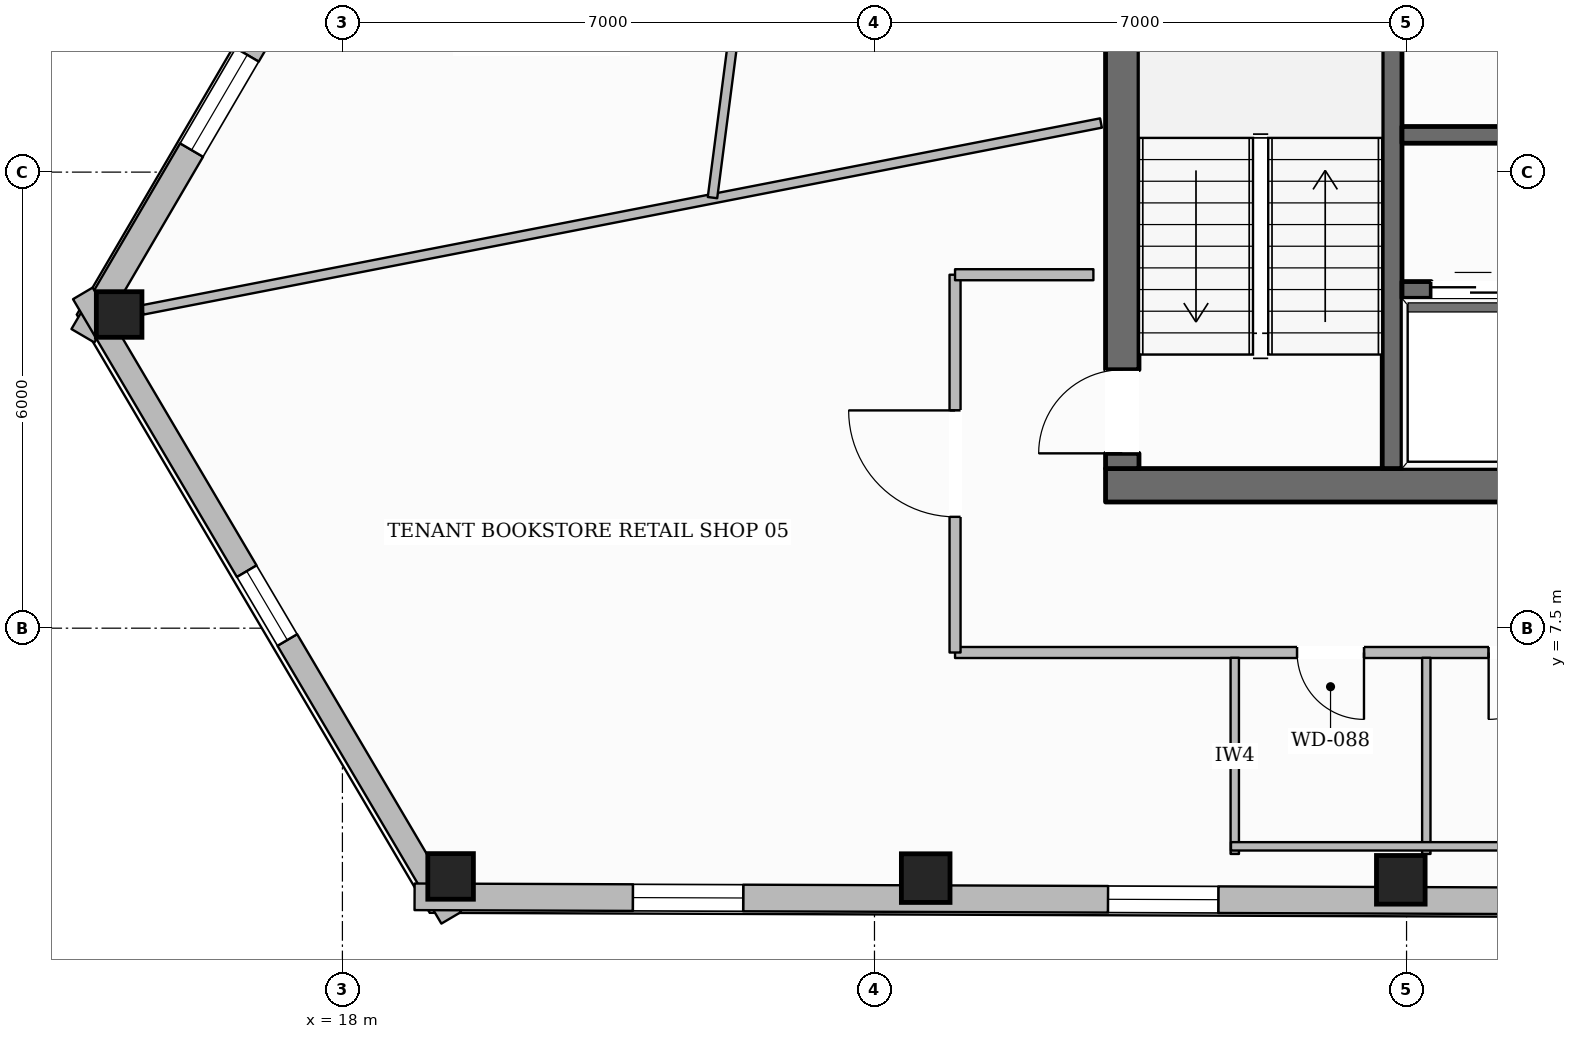
"""IFC4 building model, lengths in metres.
Left out: names, types, materials, properties, quantities, classifications, styles, units other than length and angle.
Written with IfcOpenShell. Run it as: python <this file> out.ifc"""

import sys

from ifc_helpers import new_model, si_unit, direction, frame, frame_2d, origin, origin_2d, place, context, subcontext, project, spatial, rectangle, hollow_rectangle, extrude, element, fill, save


model = new_model("IFC4")
c1 = context("Model", 3, precision=1e-05, world=origin(), true_north=direction((0.0, 1.0)))
c2 = subcontext(c1, "Body", "Model", "MODEL_VIEW")
j1 = project(units=[si_unit("LENGTHUNIT", "METRE"), si_unit("PLANEANGLEUNIT", "RADIAN")], contexts=[c1])
p1 = place(None, origin())
s1 = spatial("IfcSite", under=j1, at=p1, CompositionType="ELEMENT")
p2 = place(p1, origin())
s2 = spatial("IfcBuilding", under=s1, at=p2, CompositionType="ELEMENT")
p3 = place(p2, frame((0.0, 0.0, 199.65)))
s3 = spatial("IfcBuildingStorey", under=s2, at=p3, CompositionType="ELEMENT", Elevation=199.65)
p4 = place(p3, frame((28.04, 9.38, 0.0), z_axis=(0.0, 0.0, 1.0), x_axis=(1.0, 0.0, 0.0)))
e1 = element("IfcWall", 1, at=p4, inside=s3, PredefinedType="SOLIDWALL", context=c2, shape_type="SweptSolid", body=[
    extrude(rectangle(XDim=19.92, YDim=0.44, at=frame_2d((9.96, 0.0))), origin(), (0.0, 0.0, 1.0), 3.6),
])
p5 = place(p4, frame((10.46, 0.0, 0.0)))
e2 = element("IfcOpeningElement", 2, at=p5, cuts=e1, PredefinedType="OPENING", context=c2, shape_type="SweptSolid", body=[
    extrude(rectangle(XDim=1.4, YDim=2.2, at=frame_2d((0.7, 1.1))), frame((0.0, 0.23, 0.0), z_axis=(0.0, -1.0, 0.0), x_axis=(1.0, 0.0, 0.0)), (0.0, 0.0, 1.0), 0.46),
])
p6 = place(p3, frame((28.26, 9.6, 0.0), z_axis=(0.0, 0.0, 1.0), x_axis=(0.0, 1.0, 0.0)))
e3 = element("IfcWall", 3, at=p6, inside=s3, PredefinedType="SOLIDWALL", context=c2, shape_type="SweptSolid", body=[
    extrude(rectangle(XDim=13.0, YDim=0.44, at=frame_2d((6.5, 0.0))), origin(), (0.0, 0.0, 1.0), 3.6),
])
p7 = place(p6, frame((0.2, 0.0, 0.0)))
e4 = element("IfcOpeningElement", 4, at=p7, cuts=e3, PredefinedType="OPENING", context=c2, shape_type="SweptSolid", body=[
    extrude(rectangle(XDim=1.1, YDim=2.15, at=frame_2d((0.55, 1.075))), frame((0.0, 0.23, 0.0), z_axis=(0.0, -1.0, 0.0), x_axis=(1.0, 0.0, 0.0)), (0.0, 0.0, 1.0), 0.46),
])
p8 = place(p6, frame((8.4, 0.0, 0.0)))
e5 = element("IfcOpeningElement", 5, at=p8, cuts=e3, PredefinedType="OPENING", context=c2, shape_type="SweptSolid", body=[
    extrude(rectangle(XDim=0.9, YDim=2.1, at=frame_2d((0.45, 1.05))), frame((0.0, 0.23, 0.0), z_axis=(0.0, -1.0, 0.0), x_axis=(1.0, 0.0, 0.0)), (0.0, 0.0, 1.0), 0.46),
])
p9 = place(p3, frame((31.81, 9.6, 0.0), z_axis=(0.0, 0.0, 1.0), x_axis=(0.0, 1.0, 0.0)))
e6 = element("IfcWall", 6, at=p9, inside=s3, PredefinedType="SHEAR", context=c2, shape_type="SweptSolid", body=[
    extrude(rectangle(XDim=13.0, YDim=0.26, at=frame_2d((6.5, 0.0))), origin(), (0.0, 0.0, 1.0), 3.6),
])
p10 = place(p9, frame((10.925, 0.0, 0.0)))
e7 = element("IfcOpeningElement", 7, at=p10, cuts=e6, PredefinedType="OPENING", context=c2, shape_type="SweptSolid", body=[
    extrude(rectangle(XDim=1.25, YDim=2.25, at=frame_2d((0.625, 1.125))), frame((0.0, 0.14, 0.0), z_axis=(0.0, -1.0, 0.0), x_axis=(1.0, 0.0, 0.0)), (0.0, 0.0, 1.0), 0.28),
])
p11 = place(p3, frame((31.94, 13.99, 0.0), z_axis=(0.0, 0.0, 1.0), x_axis=(1.0, 0.0, 0.0)))
e8 = element("IfcWall", 8, at=p11, inside=s3, PredefinedType="SOLIDWALL", context=c2, shape_type="SweptSolid", body=[
    extrude(rectangle(XDim=12.12, YDim=0.22, at=frame_2d((6.06, 0.0))), origin(), (0.0, 0.0, 1.0), 3.6),
])
p12 = place(p11, frame((3.11, 0.0, 0.0)))
e9 = element("IfcOpeningElement", 9, at=p12, cuts=e8, PredefinedType="OPENING", context=c2, shape_type="SweptSolid", body=[
    extrude(rectangle(XDim=0.9, YDim=2.1, at=frame_2d((0.45, 1.05))), frame((0.0, 0.12, 0.0), z_axis=(0.0, -1.0, 0.0), x_axis=(1.0, 0.0, 0.0)), (0.0, 0.0, 1.0), 0.24),
])
p13 = place(p11, frame((9.21, 0.0, 0.0)))
e10 = element("IfcOpeningElement", 10, at=p13, cuts=e8, PredefinedType="OPENING", context=c2, shape_type="SweptSolid", body=[
    extrude(rectangle(XDim=0.9, YDim=2.1, at=frame_2d((0.45, 1.05))), frame((0.0, 0.12, 0.0), z_axis=(0.0, -1.0, 0.0), x_axis=(1.0, 0.0, 0.0)), (0.0, 0.0, 1.0), 0.24),
])
p14 = place(p3, frame((31.94, 11.95, 0.0), z_axis=(0.0, 0.0, 1.0), x_axis=(1.0, 0.0, 0.0)))
e11 = element("IfcWall", 11, at=p14, inside=s3, PredefinedType="SOLIDWALL", context=c2, shape_type="SweptSolid", body=[
    extrude(rectangle(XDim=6.19, YDim=0.22, at=frame_2d((3.095, 0.0))), origin(), (0.0, 0.0, 1.0), 3.6),
])
p15 = place(p14, frame((0.385, 0.0, 0.0)))
e12 = element("IfcOpeningElement", 12, at=p15, cuts=e11, PredefinedType="OPENING", context=c2, shape_type="SweptSolid", body=[
    extrude(rectangle(XDim=1.1, YDim=2.2, at=frame_2d((0.55, 1.1))), frame((0.0, 0.12, 0.0), z_axis=(0.0, -1.0, 0.0), x_axis=(1.0, 0.0, 0.0)), (0.0, 0.0, 1.0), 0.24),
])
p16 = place(p14, frame((2.435, 0.0, 0.0)))
e13 = element("IfcOpeningElement", 13, at=p16, cuts=e11, PredefinedType="OPENING", context=c2, shape_type="SweptSolid", body=[
    extrude(rectangle(XDim=1.1, YDim=2.2, at=frame_2d((0.55, 1.1))), frame((0.0, 0.12, 0.0), z_axis=(0.0, -1.0, 0.0), x_axis=(1.0, 0.0, 0.0)), (0.0, 0.0, 1.0), 0.24),
])
p17 = place(p14, frame((4.485, 0.0, 0.0)))
e14 = element("IfcOpeningElement", 14, at=p17, cuts=e11, PredefinedType="OPENING", context=c2, shape_type="SweptSolid", body=[
    extrude(rectangle(XDim=1.1, YDim=2.2, at=frame_2d((0.55, 1.1))), frame((0.0, 0.12, 0.0), z_axis=(0.0, -1.0, 0.0), x_axis=(1.0, 0.0, 0.0)), (0.0, 0.0, 1.0), 0.24),
])
for number, where, z_axis, x_axis in (
    (15, (15.062, 11.627, 0.0), (0.0, 0.0, 1.0), (1.0, 0.0, 0.0)),
    (16, (19.423, 4.234, 0.0), (0.0, 0.0, 1.0), (1.0, 0.0, 0.0)),
):
    element("IfcColumn", number, at=place(p3, frame(where, z_axis=z_axis, x_axis=x_axis)), inside=s3, PredefinedType="COLUMN", context=c2, shape_type="SweptSolid", body=[
        extrude(hollow_rectangle(XDim=0.6, YDim=0.6, WallThickness=0.028, at=origin_2d()), origin(), (0.0, 0.0, 1.0), 3.6),
    ])
for number, where, z_axis, x_axis in (
    (17, (25.674, 4.212, 0.0), (0.0, 0.0, 1.0), (1.0, 0.0, 0.0)),
    (18, (31.924, 4.189, 0.0), (0.0, 0.0, 1.0), (1.0, 0.0, 0.0)),
):
    element("IfcColumn", number, at=place(p3, frame(where, z_axis=z_axis, x_axis=x_axis)), inside=s3, PredefinedType="COLUMN", context=c2, shape_type="SweptSolid", body=[
        extrude(hollow_rectangle(XDim=0.64, YDim=0.64, WallThickness=0.028, at=origin_2d()), origin(), (0.0, 0.0, 1.0), 3.6),
    ])
p18 = place(p3, frame((14.586, 11.347, 0.0), z_axis=(0.0, 0.0, 1.0), x_axis=(0.504997770855, 0.863120647089, 0.0)))
e19 = element("IfcWall", 19, at=p18, inside=s3, PredefinedType="STANDARD", context=c2, shape_type="SweptSolid", body=[
    extrude(rectangle(XDim=37.843, YDim=0.35, at=frame_2d((18.921, 0.0))), origin(), (0.0, 0.0, 1.0), 3.132),
])
p19 = place(p18, frame((9.061, 0.0, 0.0)))
e20 = element("IfcOpeningElement", 20, at=p19, cuts=e19, PredefinedType="OPENING", context=c2, shape_type="SweptSolid", body=[
    extrude(rectangle(XDim=1.0, YDim=2.2, at=frame_2d((0.5, 1.1))), frame((0.0, 0.185, 0.0), z_axis=(0.0, -1.0, 0.0), x_axis=(1.0, 0.0, 0.0)), (0.0, 0.0, 1.0), 0.37),
])
p20 = place(p18, frame((33.567, 0.0, 0.65)))
e21 = element("IfcOpeningElement", 21, at=p20, cuts=e19, PredefinedType="OPENING", context=c2, shape_type="SweptSolid", body=[
    extrude(rectangle(XDim=1.45, YDim=1.75, at=frame_2d((0.725, 0.875))), frame((0.0, 0.185, 0.0), z_axis=(0.0, -1.0, 0.0), x_axis=(1.0, 0.0, 0.0)), (0.0, 0.0, 1.0), 0.37),
])
p21 = place(p18, frame((27.42, 0.0, 0.65)))
e22 = element("IfcOpeningElement", 22, at=p21, cuts=e19, PredefinedType="OPENING", context=c2, shape_type="SweptSolid", body=[
    extrude(rectangle(XDim=1.45, YDim=1.75, at=frame_2d((0.725, 0.875))), frame((0.0, 0.185, 0.0), z_axis=(0.0, -1.0, 0.0), x_axis=(1.0, 0.0, 0.0)), (0.0, 0.0, 1.0), 0.37),
])
p22 = place(p18, frame((21.273, 0.0, 0.65)))
e23 = element("IfcOpeningElement", 23, at=p22, cuts=e19, PredefinedType="OPENING", context=c2, shape_type="SweptSolid", body=[
    extrude(rectangle(XDim=1.45, YDim=1.75, at=frame_2d((0.725, 0.875))), frame((0.0, 0.185, 0.0), z_axis=(0.0, -1.0, 0.0), x_axis=(1.0, 0.0, 0.0)), (0.0, 0.0, 1.0), 0.37),
])
p23 = place(p18, frame((2.831, 0.0, 0.65)))
e24 = element("IfcOpeningElement", 24, at=p23, cuts=e19, PredefinedType="OPENING", context=c2, shape_type="SweptSolid", body=[
    extrude(rectangle(XDim=1.45, YDim=1.75, at=frame_2d((0.725, 0.875))), frame((0.0, 0.185, 0.0), z_axis=(0.0, -1.0, 0.0), x_axis=(1.0, 0.0, 0.0)), (0.0, 0.0, 1.0), 0.37),
])
p24 = place(p3, frame((19.431, 3.69, 0.0), z_axis=(0.0, 0.0, 1.0), x_axis=(-0.508074619141, 0.861313056551, 0.0)))
e25 = element("IfcWall", 25, at=p24, inside=s3, PredefinedType="STANDARD", context=c2, shape_type="SweptSolid", body=[
    extrude(rectangle(XDim=9.538, YDim=0.3, at=frame_2d((4.769, 0.0))), origin(), (0.0, 0.0, 1.0), 3.132),
])
p25 = place(p24, frame((4.244, 0.0, 0.65)))
e26 = element("IfcOpeningElement", 26, at=p25, cuts=e25, PredefinedType="OPENING", context=c2, shape_type="SweptSolid", body=[
    extrude(rectangle(XDim=1.05, YDim=1.7, at=frame_2d((0.525, 0.85))), frame((0.0, 0.16, 0.0), z_axis=(0.0, -1.0, 0.0), x_axis=(1.0, 0.0, 0.0)), (0.0, 0.0, 1.0), 0.32),
])
p26 = place(p3, frame((57.402, 3.828, 0.0), z_axis=(0.0, 0.0, 1.0), x_axis=(-0.999993611248, 0.003574557642, 0.0)))
e27 = element("IfcWall", 27, at=p26, inside=s3, PredefinedType="STANDARD", context=c2, shape_type="SweptSolid", body=[
    extrude(rectangle(XDim=38.453, YDim=0.35, at=frame_2d((19.226, 0.0))), origin(), (0.0, 0.0, 1.0), 3.132),
])
p27 = place(p26, frame((34.129, 0.0, 0.65)))
e28 = element("IfcOpeningElement", 28, at=p27, cuts=e27, PredefinedType="OPENING", context=c2, shape_type="SweptSolid", body=[
    extrude(rectangle(XDim=1.45, YDim=1.75, at=frame_2d((0.725, 0.875))), frame((0.0, 0.185, 0.0), z_axis=(0.0, -1.0, 0.0), x_axis=(1.0, 0.0, 0.0)), (0.0, 0.0, 1.0), 0.37),
])
p28 = place(p26, frame((27.879, 0.0, 0.65)))
e29 = element("IfcOpeningElement", 29, at=p28, cuts=e27, PredefinedType="OPENING", context=c2, shape_type="SweptSolid", body=[
    extrude(rectangle(XDim=1.45, YDim=1.75, at=frame_2d((0.725, 0.875))), frame((0.0, 0.185, 0.0), z_axis=(0.0, -1.0, 0.0), x_axis=(1.0, 0.0, 0.0)), (0.0, 0.0, 1.0), 0.37),
])
p29 = place(p26, frame((21.628, 0.0, 0.65)))
e30 = element("IfcOpeningElement", 30, at=p29, cuts=e27, PredefinedType="OPENING", context=c2, shape_type="SweptSolid", body=[
    extrude(rectangle(XDim=1.45, YDim=1.75, at=frame_2d((0.725, 0.875))), frame((0.0, 0.185, 0.0), z_axis=(0.0, -1.0, 0.0), x_axis=(1.0, 0.0, 0.0)), (0.0, 0.0, 1.0), 0.37),
])
p30 = place(p26, frame((9.127, 0.0, 0.65)))
e31 = element("IfcOpeningElement", 31, at=p30, cuts=e27, PredefinedType="OPENING", context=c2, shape_type="SweptSolid", body=[
    extrude(rectangle(XDim=1.45, YDim=1.75, at=frame_2d((0.725, 0.875))), frame((0.0, 0.185, 0.0), z_axis=(0.0, -1.0, 0.0), x_axis=(1.0, 0.0, 0.0)), (0.0, 0.0, 1.0), 0.37),
])
p31 = place(p26, frame((2.877, 0.0, 0.65)))
e32 = element("IfcOpeningElement", 32, at=p31, cuts=e27, PredefinedType="OPENING", context=c2, shape_type="SweptSolid", body=[
    extrude(rectangle(XDim=1.45, YDim=1.75, at=frame_2d((0.725, 0.875))), frame((0.0, 0.185, 0.0), z_axis=(0.0, -1.0, 0.0), x_axis=(1.0, 0.0, 0.0)), (0.0, 0.0, 1.0), 0.37),
])
p32 = place(p3, frame((49.94, 7.18, 0.0), z_axis=(0.0, 0.0, 1.0), x_axis=(-1.0, 0.0, 0.0)))
e33 = element("IfcWall", 33, at=p32, inside=s3, PredefinedType="PARTITIONING", context=c2, shape_type="SweptSolid", body=[
    extrude(rectangle(XDim=23.88, YDim=0.145, at=frame_2d((11.94, 0.0))), origin(), (0.0, 0.0, 1.0), 3.6),
])
p33 = place(p32, frame((18.5, 0.0, 0.0)))
e34 = element("IfcOpeningElement", 34, at=p33, cuts=e33, PredefinedType="OPENING", context=c2, shape_type="SweptSolid", body=[
    extrude(rectangle(XDim=0.88, YDim=2.1, at=frame_2d((0.44, 1.05))), frame((0.0, 0.083, 0.0), z_axis=(0.0, -1.0, 0.0), x_axis=(1.0, 0.0, 0.0)), (0.0, 0.0, 1.0), 0.165),
])
p34 = place(p32, frame((15.98, 0.0, 0.0)))
e35 = element("IfcOpeningElement", 35, at=p34, cuts=e33, PredefinedType="OPENING", context=c2, shape_type="SweptSolid", body=[
    extrude(rectangle(XDim=0.88, YDim=2.1, at=frame_2d((0.44, 1.05))), frame((0.0, 0.083, 0.0), z_axis=(0.0, -1.0, 0.0), x_axis=(1.0, 0.0, 0.0)), (0.0, 0.0, 1.0), 0.165),
])
p35 = place(p32, frame((13.52, 0.0, 0.0)))
e36 = element("IfcOpeningElement", 36, at=p35, cuts=e33, PredefinedType="OPENING", context=c2, shape_type="SweptSolid", body=[
    extrude(rectangle(XDim=0.96, YDim=2.1, at=frame_2d((0.48, 1.05))), frame((0.0, 0.083, 0.0), z_axis=(0.0, -1.0, 0.0), x_axis=(1.0, 0.0, 0.0)), (0.0, 0.0, 1.0), 0.165),
])
p36 = place(p32, frame((7.249, 0.0, 0.0)))
e37 = element("IfcOpeningElement", 37, at=p36, cuts=e33, PredefinedType="OPENING", context=c2, shape_type="SweptSolid", body=[
    extrude(rectangle(XDim=0.98, YDim=2.15, at=frame_2d((0.49, 1.075))), frame((0.0, 0.083, 0.0), z_axis=(0.0, -1.0, 0.0), x_axis=(1.0, 0.0, 0.0)), (0.0, 0.0, 1.0), 0.165),
])
p37 = place(p32, frame((0.616, 0.0, 0.0)))
e38 = element("IfcOpeningElement", 38, at=p37, cuts=e33, PredefinedType="OPENING", context=c2, shape_type="SweptSolid", body=[
    extrude(rectangle(XDim=0.98, YDim=2.15, at=frame_2d((0.49, 1.075))), frame((0.0, 0.083, 0.0), z_axis=(0.0, -1.0, 0.0), x_axis=(1.0, 0.0, 0.0)), (0.0, 0.0, 1.0), 0.165),
])
p38 = place(p3, frame((26.06, 7.18, 0.0), z_axis=(0.0, 0.0, 1.0), x_axis=(0.0, 1.0, 0.0)))
e39 = element("IfcWall", 39, at=p38, inside=s3, PredefinedType="PARTITIONING", context=c2, shape_type="SweptSolid", body=[
    extrude(rectangle(XDim=4.97, YDim=0.145, at=frame_2d((2.485, 0.0))), origin(), (0.0, 0.0, 1.0), 3.6),
])
p39 = place(p38, frame((1.785, 0.0, 0.0)))
e40 = element("IfcOpeningElement", 40, at=p39, cuts=e39, PredefinedType="OPENING", context=c2, shape_type="SweptSolid", body=[
    extrude(rectangle(XDim=1.4, YDim=2.2, at=frame_2d((0.7, 1.1))), frame((0.0, 0.083, 0.0), z_axis=(0.0, -1.0, 0.0), x_axis=(1.0, 0.0, 0.0)), (0.0, 0.0, 1.0), 0.165),
])
p40 = place(p3, frame((26.06, 12.15, 0.0), z_axis=(0.0, 0.0, 1.0), x_axis=(1.0, 0.0, 0.0)))
e41 = element("IfcWall", 41, at=p40, inside=s3, PredefinedType="PARTITIONING", context=c2, shape_type="SweptSolid", body=[
    extrude(rectangle(XDim=1.82, YDim=0.145, at=frame_2d((0.91, 0.0))), origin(), (0.0, 0.0, 1.0), 3.6),
])
for number, where, z_axis, x_axis in (
    (42, (29.74, 4.53, 0.0), (0.0, 0.0, 1.0), (0.0, 1.0, 0.0)),
    (43, (32.26, 4.53, 0.0), (0.0, 0.0, 1.0), (0.0, 1.0, 0.0)),
):
    element("IfcWall", number, at=place(p3, frame(where, z_axis=z_axis, x_axis=x_axis)), inside=s3, PredefinedType="PLUMBINGWALL", context=c2, shape_type="SweptSolid", body=[
        extrude(rectangle(XDim=2.58, YDim=0.11, at=frame_2d((1.29, 0.0))), origin(), (0.0, 0.0, 1.0), 3.6),
    ])
p41 = place(p3, frame((29.69, 4.63, 0.0), z_axis=(0.0, 0.0, 1.0), x_axis=(1.0, 0.0, 0.0)))
e44 = element("IfcWall", 44, at=p41, inside=s3, PredefinedType="PLUMBINGWALL", context=c2, shape_type="SweptSolid", body=[
    extrude(rectangle(XDim=7.46, YDim=0.11, at=frame_2d((3.73, 0.0))), origin(), (0.0, 0.0, 1.0), 3.6),
])
p42 = place(p3, frame((27.98, 14.146, 0.0), z_axis=(0.0, 0.0, 1.0), x_axis=(-0.981510799249, -0.191406768317, 0.0)))
e45 = element("IfcWall", 45, at=p42, inside=s3, PredefinedType="PARTITIONING", context=c2, shape_type="SweptSolid", body=[
    extrude(rectangle(XDim=12.847, YDim=0.125, at=frame_2d((6.423, 0.0))), origin(), (0.0, 0.0, 1.0), 3.141),
])
p43 = place(p3, frame((24.695, 27.217, 0.0), z_axis=(0.0, 0.0, 1.0), x_axis=(-0.128889138704, -0.991659008896, 0.0)))
e46 = element("IfcWall", 46, at=p43, inside=s3, PredefinedType="PARTITIONING", context=c2, shape_type="SweptSolid", body=[
    extrude(rectangle(XDim=14.17, YDim=0.125, at=frame_2d((7.085, 0.0))), origin(), (0.0, 0.0, 1.0), 3.339),
])
p44 = place(p43, frame((6.591, 0.0, 0.0)))
e47 = element("IfcOpeningElement", 47, at=p44, cuts=e46, PredefinedType="OPENING", context=c2, shape_type="SweptSolid", body=[
    extrude(rectangle(XDim=0.98, YDim=2.15, at=frame_2d((0.49, 1.075))), frame((0.0, 0.073, 0.0), z_axis=(0.0, -1.0, 0.0), x_axis=(1.0, 0.0, 0.0)), (0.0, 0.0, 1.0), 0.145),
])
p45 = place(p23, origin())
e48 = element("IfcWindow", 48, at=p45, inside=s3, PartitioningType="SINGLE_PANEL", PredefinedType="WINDOW", context=c2, shape_type="SweptSolid", body=[
    extrude(rectangle(XDim=1.45, YDim=1.75, at=frame_2d((0.725, 0.875))), frame((0.0, 0.03, 0.0), z_axis=(0.0, -1.0, 0.0), x_axis=(1.0, 0.0, 0.0)), (0.0, 0.0, 1.0), 0.06),
])
fill(e24, e48)
p46 = place(p27, origin())
e49 = element("IfcWindow", 49, at=p46, inside=s3, PartitioningType="SINGLE_PANEL", PredefinedType="WINDOW", context=c2, shape_type="SweptSolid", body=[
    extrude(rectangle(XDim=1.45, YDim=1.75, at=frame_2d((0.725, 0.875))), frame((0.0, 0.03, 0.0), z_axis=(0.0, -1.0, 0.0), x_axis=(1.0, 0.0, 0.0)), (0.0, 0.0, 1.0), 0.06),
])
fill(e28, e49)
p47 = place(p28, origin())
e50 = element("IfcWindow", 50, at=p47, inside=s3, PartitioningType="SINGLE_PANEL", PredefinedType="WINDOW", context=c2, shape_type="SweptSolid", body=[
    extrude(rectangle(XDim=1.45, YDim=1.75, at=frame_2d((0.725, 0.875))), frame((0.0, 0.03, 0.0), z_axis=(0.0, -1.0, 0.0), x_axis=(1.0, 0.0, 0.0)), (0.0, 0.0, 1.0), 0.06),
])
fill(e29, e50)
p48 = place(p25, origin())
e51 = element("IfcWindow", 51, at=p48, inside=s3, PartitioningType="SINGLE_PANEL", PredefinedType="WINDOW", context=c2, shape_type="SweptSolid", body=[
    extrude(rectangle(XDim=1.05, YDim=1.7, at=frame_2d((0.525, 0.85))), frame((0.0, 0.03, 0.0), z_axis=(0.0, -1.0, 0.0), x_axis=(1.0, 0.0, 0.0)), (0.0, 0.0, 1.0), 0.06),
])
fill(e26, e51)
p49 = place(p7, origin())
e52 = element("IfcDoor", 52, at=p49, inside=s3, OperationType="SINGLE_SWING_LEFT", PredefinedType="DOOR", context=c2, shape_type="SweptSolid", body=[
    extrude(rectangle(XDim=1.1, YDim=2.15, at=frame_2d((0.55, 1.075))), frame((0.0, 0.025, 0.0), z_axis=(0.0, -1.0, 0.0), x_axis=(1.0, 0.0, 0.0)), (0.0, 0.0, 1.0), 0.05),
])
fill(e4, e52)
p50 = place(p15, origin())
e53 = element("IfcDoor", 53, at=p50, inside=s3, OperationType="DOUBLE_DOOR_SLIDING", PredefinedType="DOOR", context=c2, shape_type="SweptSolid", body=[
    extrude(rectangle(XDim=1.1, YDim=2.2, at=frame_2d((0.55, 1.1))), frame((0.0, 0.025, 0.0), z_axis=(0.0, -1.0, 0.0), x_axis=(1.0, 0.0, 0.0)), (0.0, 0.0, 1.0), 0.05),
])
fill(e12, e53)
p51 = place(p33, origin())
e54 = element("IfcDoor", 54, at=p51, inside=s3, OperationType="SINGLE_SWING_LEFT", PredefinedType="DOOR", context=c2, shape_type="SweptSolid", body=[
    extrude(rectangle(XDim=0.88, YDim=2.1, at=frame_2d((0.44, 1.05))), frame((0.0, 0.025, 0.0), z_axis=(0.0, -1.0, 0.0), x_axis=(1.0, 0.0, 0.0)), (0.0, 0.0, 1.0), 0.05),
])
fill(e34, e54)
p52 = place(p34, origin())
e55 = element("IfcDoor", 55, at=p52, inside=s3, OperationType="SINGLE_SWING_RIGHT", PredefinedType="DOOR", context=c2, shape_type="SweptSolid", body=[
    extrude(rectangle(XDim=0.88, YDim=2.1, at=frame_2d((0.44, 1.05))), frame((0.0, 0.025, 0.0), z_axis=(0.0, -1.0, 0.0), x_axis=(1.0, 0.0, 0.0)), (0.0, 0.0, 1.0), 0.05),
])
fill(e35, e55)
p53 = place(p39, origin())
e56 = element("IfcDoor", 56, at=p53, inside=s3, OperationType="SINGLE_SWING_RIGHT", PredefinedType="DOOR", context=c2, shape_type="SweptSolid", body=[
    extrude(rectangle(XDim=1.4, YDim=2.2, at=frame_2d((0.7, 1.1))), frame((0.0, 0.025, 0.0), z_axis=(0.0, -1.0, 0.0), x_axis=(1.0, 0.0, 0.0)), (0.0, 0.0, 1.0), 0.05),
])
fill(e40, e56)
save(model, sys.argv[1])
